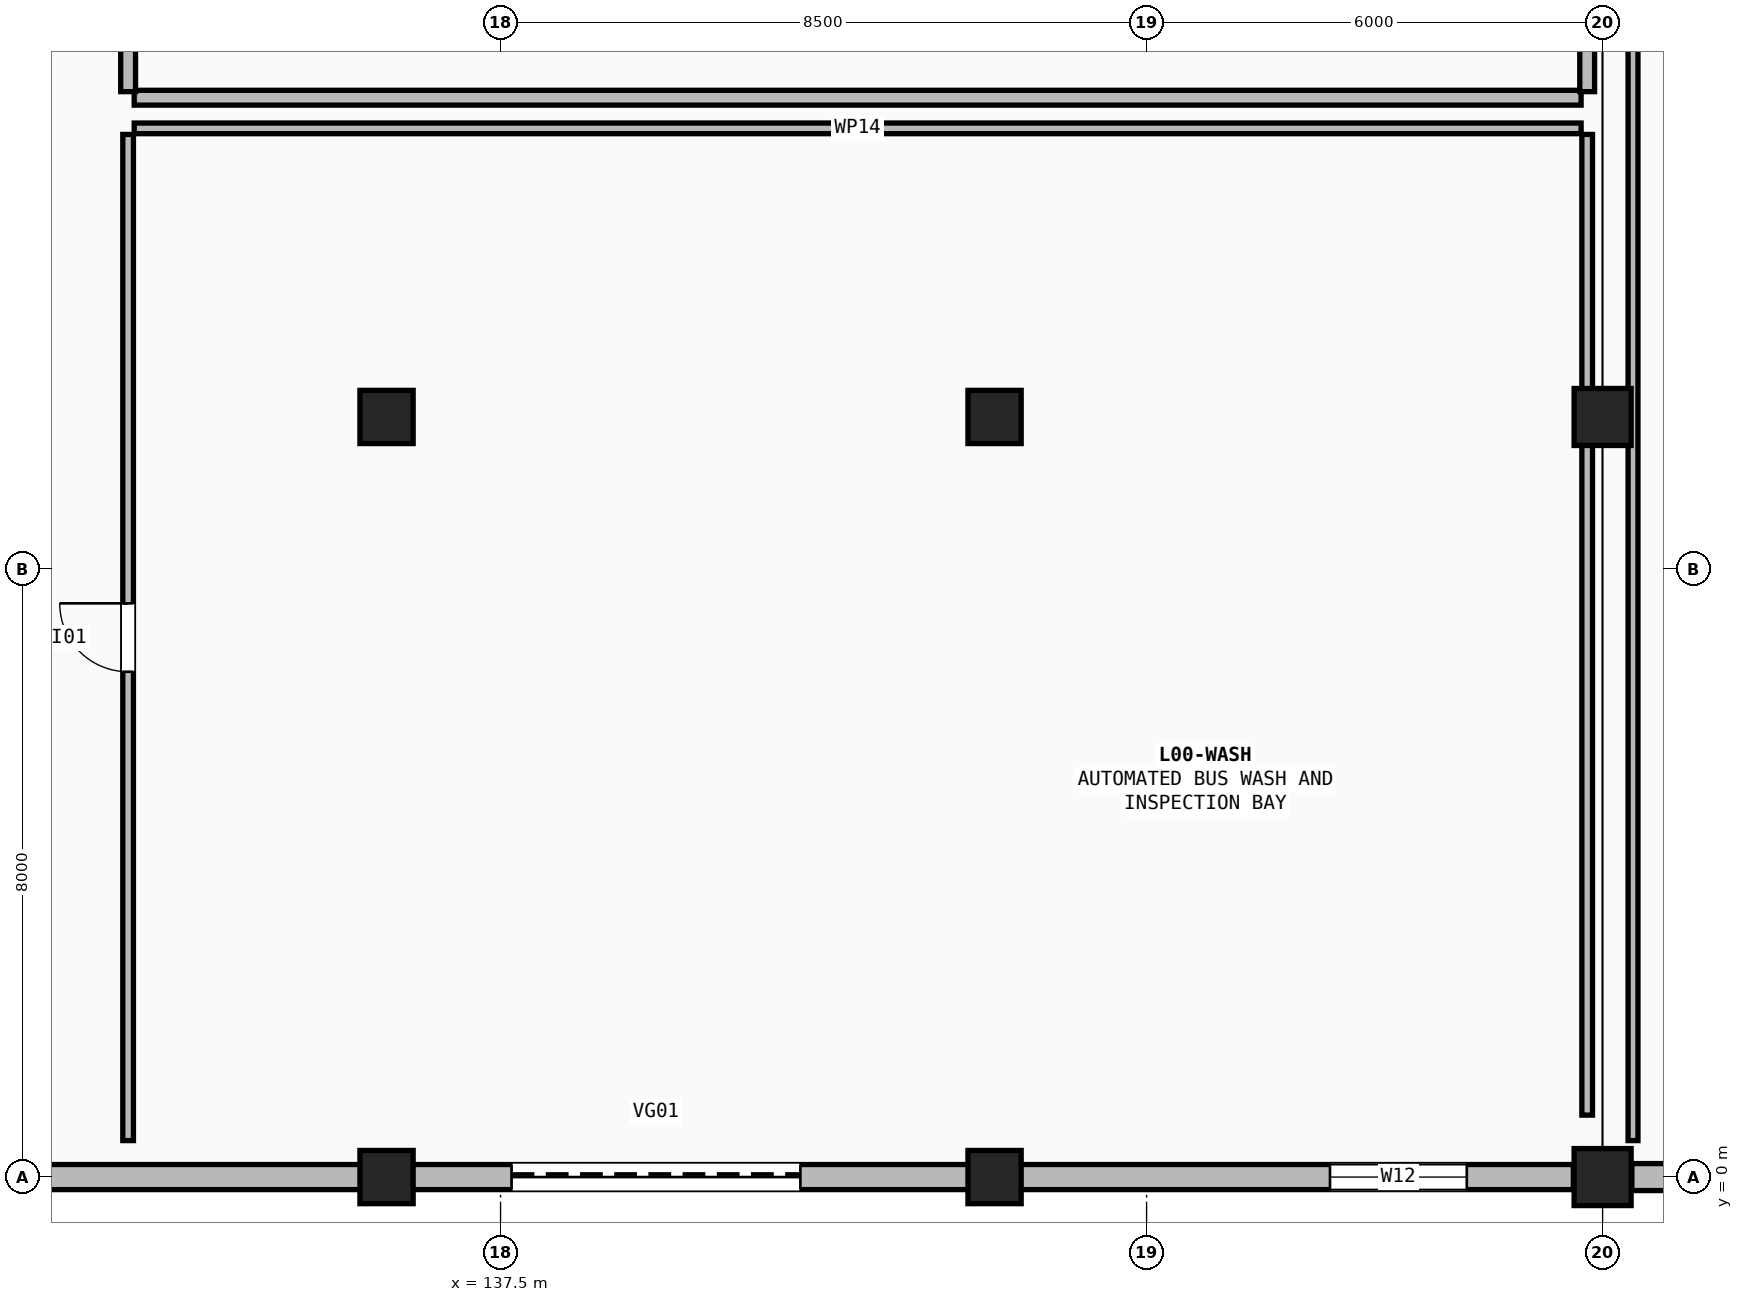
"""IFC4 building model, lengths in metres.
Left out: names, types, materials, properties, quantities, classifications, styles, units other than length and angle.
Written with IfcOpenShell. Run it as: python <this file> out.ifc"""

import sys

from ifc_helpers import new_model, si_unit, direction, frame, frame_2d, origin, origin_2d, place, context, subcontext, project, spatial, rectangle, extrude, element, fill, save


model = new_model("IFC4")
c1 = context("Model", 3, precision=1e-05, world=origin(), true_north=direction((0.0, 1.0)))
c2 = subcontext(c1, "Body", "Model", "MODEL_VIEW")
j1 = project(units=[si_unit("LENGTHUNIT", "METRE"), si_unit("PLANEANGLEUNIT", "RADIAN")], contexts=[c1])
p1 = place(None, origin())
s1 = spatial("IfcSite", under=j1, at=p1, CompositionType="ELEMENT")
p2 = place(p1, origin())
s2 = spatial("IfcBuilding", under=s1, at=p2, CompositionType="ELEMENT")
p3 = place(p2, origin())
s3 = spatial("IfcBuildingStorey", under=s2, at=p3, CompositionType="ELEMENT", Elevation=0.0)
for number, where, z_axis, x_axis in (
    (1, (136.0, 0.0, 0.0), (0.0, 0.0, 1.0), (1.0, 0.0, 0.0)),
    (2, (136.0, 10.0, 0.0), (0.0, 0.0, 1.0), (1.0, 0.0, 0.0)),
    (3, (144.0, 0.0, 0.0), (0.0, 0.0, 1.0), (1.0, 0.0, 0.0)),
    (4, (144.0, 10.0, 0.0), (0.0, 0.0, 1.0), (1.0, 0.0, 0.0)),
):
    element("IfcColumn", number, at=place(p3, frame(where, z_axis=z_axis, x_axis=x_axis)), inside=s3, PredefinedType="COLUMN", context=c2, shape_type="SweptSolid", body=[
        extrude(rectangle(XDim=0.7, YDim=0.7, at=origin_2d()), origin(), (0.0, 0.0, 1.0), 4.5),
    ])
for number, where, z_axis, x_axis in (
    (5, (152.0, 0.0, 0.0), (0.0, 0.0, 1.0), (1.0, 0.0, 0.0)),
    (6, (152.0, 10.0, 0.0), (0.0, 0.0, 1.0), (1.0, 0.0, 0.0)),
):
    element("IfcColumn", number, at=place(p3, frame(where, z_axis=z_axis, x_axis=x_axis)), inside=s3, PredefinedType="COLUMN", context=c2, shape_type="SweptSolid", body=[
        extrude(rectangle(XDim=0.75, YDim=0.75, at=origin_2d()), origin(), (0.0, 0.0, 1.0), 4.5),
    ])
p4 = place(p3, frame((128.59, 0.0, 0.0), z_axis=(0.0, 0.0, 1.0), x_axis=(1.0, 0.0, 0.0)))
e7 = element("IfcWall", 7, at=p4, inside=s3, PredefinedType="SOLIDWALL", context=c2, shape_type="SweptSolid", body=[
    extrude(rectangle(XDim=23.025, YDim=0.33, at=frame_2d((11.512, 0.0))), origin(), (0.0, 0.0, 1.0), 3.345),
])
p5 = place(p4, frame((1.217, 0.0, 0.0)))
e8 = element("IfcOpeningElement", 8, at=p5, cuts=e7, PredefinedType="OPENING", context=c2, shape_type="SweptSolid", body=[
    extrude(rectangle(XDim=1.25, YDim=2.2, at=frame_2d((0.625, 1.1))), frame((0.0, 0.175, 0.0), z_axis=(0.0, -1.0, 0.0), x_axis=(1.0, 0.0, 0.0)), (0.0, 0.0, 1.0), 0.35),
])
p6 = place(p4, frame((9.055, 0.0, 0.0)))
e9 = element("IfcOpeningElement", 9, at=p6, cuts=e7, PredefinedType="OPENING", context=c2, shape_type="SweptSolid", body=[
    extrude(rectangle(XDim=3.8, YDim=3.2, at=frame_2d((1.9, 1.6))), frame((0.0, 0.175, 0.0), z_axis=(0.0, -1.0, 0.0), x_axis=(1.0, 0.0, 0.0)), (0.0, 0.0, 1.0), 0.35),
])
p7 = place(p4, frame((19.823, 0.0, 1.05)))
e10 = element("IfcOpeningElement", 10, at=p7, cuts=e7, PredefinedType="OPENING", context=c2, shape_type="SweptSolid", body=[
    extrude(rectangle(XDim=1.8, YDim=1.8, at=frame_2d((0.9, 0.9))), frame((0.0, 0.175, 0.0), z_axis=(0.0, -1.0, 0.0), x_axis=(1.0, 0.0, 0.0)), (0.0, 0.0, 1.0), 0.35),
])
p8 = place(p3, frame((152.385, 0.0, 0.0), z_axis=(0.0, 0.0, 1.0), x_axis=(1.0, 0.0, 0.0)))
e11 = element("IfcWall", 11, at=p8, inside=s3, PredefinedType="SOLIDWALL", context=c2, shape_type="SweptSolid", body=[
    extrude(rectangle(XDim=15.23, YDim=0.355, at=frame_2d((7.615, 0.0))), origin(), (0.0, 0.0, 1.0), 7.165),
])
p9 = place(p8, frame((5.015, 0.0, 0.0)))
e12 = element("IfcOpeningElement", 12, at=p9, cuts=e11, PredefinedType="OPENING", context=c2, shape_type="SweptSolid", body=[
    extrude(rectangle(XDim=5.2, YDim=4.2, at=frame_2d((2.6, 2.1))), frame((0.0, 0.188, 0.0), z_axis=(0.0, -1.0, 0.0), x_axis=(1.0, 0.0, 0.0)), (0.0, 0.0, 1.0), 0.375),
])
p10 = place(p8, frame((1.4, 0.0, 5.1)))
e13 = element("IfcOpeningElement", 13, at=p10, cuts=e11, PredefinedType="OPENING", context=c2, shape_type="SweptSolid", body=[
    extrude(rectangle(XDim=2.7, YDim=1.8, at=frame_2d((1.35, 0.9))), frame((0.0, 0.188, 0.0), z_axis=(0.0, -1.0, 0.0), x_axis=(1.0, 0.0, 0.0)), (0.0, 0.0, 1.0), 0.375),
])
p11 = place(p8, frame((11.0, 0.0, 5.1)))
e14 = element("IfcOpeningElement", 14, at=p11, cuts=e11, PredefinedType="OPENING", context=c2, shape_type="SweptSolid", body=[
    extrude(rectangle(XDim=2.7, YDim=1.8, at=frame_2d((1.35, 0.9))), frame((0.0, 0.188, 0.0), z_axis=(0.0, -1.0, 0.0), x_axis=(1.0, 0.0, 0.0)), (0.0, 0.0, 1.0), 0.375),
])
p12 = place(p3, frame((152.4, 0.48, 0.0), z_axis=(0.0, 0.0, 1.0), x_axis=(0.0, 1.0, 0.0)))
e15 = element("IfcWall", 15, at=p12, inside=s3, PredefinedType="PARTITIONING", context=c2, shape_type="SweptSolid", body=[
    extrude(rectangle(XDim=27.035, YDim=0.13, at=frame_2d((13.518, 0.0))), origin(), (0.0, 0.0, 1.0), 3.145),
])
p13 = place(p3, frame((132.68, 13.797, 0.0), z_axis=(0.0, 0.0, 1.0), x_axis=(1.0, 0.0, 0.0)))
e16 = element("IfcWall", 16, at=p13, inside=s3, PredefinedType="PARTITIONING", context=c2, shape_type="SweptSolid", body=[
    extrude(rectangle(XDim=19.037, YDim=0.14, at=frame_2d((9.519, 0.0))), origin(), (0.0, 0.0, 1.0), 3.695),
])
p14 = place(p3, frame((132.6, 0.48, 0.0), z_axis=(0.0, 0.0, 1.0), x_axis=(0.0, 1.0, 0.0)))
e17 = element("IfcWall", 17, at=p14, inside=s3, PredefinedType="PARTITIONING", context=c2, shape_type="SweptSolid", body=[
    extrude(rectangle(XDim=13.237, YDim=0.14, at=frame_2d((6.619, 0.0))), origin(), (0.0, 0.0, 1.0), 3.245),
])
p15 = place(p14, frame((6.168, 0.0, 0.0)))
e18 = element("IfcOpeningElement", 18, at=p15, cuts=e17, PredefinedType="OPENING", context=c2, shape_type="SweptSolid", body=[
    extrude(rectangle(XDim=0.9, YDim=2.1, at=frame_2d((0.45, 1.05))), frame((0.0, 0.08, 0.0), z_axis=(0.0, -1.0, 0.0), x_axis=(1.0, 0.0, 0.0)), (0.0, 0.0, 1.0), 0.16),
])
p16 = place(p3, frame((151.797, 0.815, 0.0), z_axis=(0.0, 0.0, 1.0), x_axis=(0.0, 1.0, 0.0)))
e19 = element("IfcWall", 19, at=p16, inside=s3, PredefinedType="PARTITIONING", context=c2, shape_type="SweptSolid", body=[
    extrude(rectangle(XDim=12.902, YDim=0.14, at=frame_2d((6.451, 0.0))), origin(), (0.0, 0.0, 1.0), 3.495),
])
p17 = place(p3, frame((132.68, 14.2, 0.0), z_axis=(0.0, 0.0, 1.0), x_axis=(1.0, 0.0, 0.0)))
e20 = element("IfcWall", 20, at=p17, inside=s3, PredefinedType="PARTITIONING", context=c2, shape_type="SweptSolid", body=[
    extrude(rectangle(XDim=19.037, YDim=0.195, at=frame_2d((9.519, 0.0))), origin(), (0.0, 0.0, 1.0), 3.695),
])
p18 = place(p3, frame((132.6, 14.28, 0.0), z_axis=(0.0, 0.0, 1.0), x_axis=(0.0, 1.0, 0.0)))
e21 = element("IfcWall", 21, at=p18, inside=s3, PredefinedType="PARTITIONING", context=c2, shape_type="SweptSolid", body=[
    extrude(rectangle(XDim=13.237, YDim=0.195, at=frame_2d((6.619, 0.0))), origin(), (0.0, 0.0, 1.0), 3.245),
])
p19 = place(p3, frame((151.797, 14.28, 0.0), z_axis=(0.0, 0.0, 1.0), x_axis=(0.0, 1.0, 0.0)))
e22 = element("IfcWall", 22, at=p19, inside=s3, PredefinedType="PARTITIONING", context=c2, shape_type="SweptSolid", body=[
    extrude(rectangle(XDim=12.902, YDim=0.195, at=frame_2d((6.451, 0.0))), origin(), (0.0, 0.0, 1.0), 3.145),
])
p20 = place(p6, origin())
e23 = element("IfcDoor", 23, at=p20, inside=s3, OperationType="ROLLINGUP", PredefinedType="GATE", context=c2, shape_type="SweptSolid", body=[
    extrude(rectangle(XDim=3.8, YDim=3.2, at=frame_2d((1.9, 1.6))), frame((0.0, 0.025, 0.0), z_axis=(0.0, -1.0, 0.0), x_axis=(1.0, 0.0, 0.0)), (0.0, 0.0, 1.0), 0.05),
])
fill(e9, e23)
p21 = place(p7, origin())
e24 = element("IfcWindow", 24, at=p21, inside=s3, PartitioningType="SINGLE_PANEL", PredefinedType="WINDOW", context=c2, shape_type="SweptSolid", body=[
    extrude(rectangle(XDim=1.8, YDim=1.8, at=frame_2d((0.9, 0.9))), frame((0.0, 0.03, 0.0), z_axis=(0.0, -1.0, 0.0), x_axis=(1.0, 0.0, 0.0)), (0.0, 0.0, 1.0), 0.06),
])
fill(e10, e24)
p22 = place(p15, origin())
e25 = element("IfcDoor", 25, at=p22, inside=s3, OperationType="SINGLE_SWING_RIGHT", PredefinedType="DOOR", context=c2, shape_type="SweptSolid", body=[
    extrude(rectangle(XDim=0.9, YDim=2.1, at=frame_2d((0.45, 1.05))), frame((0.0, 0.025, 0.0), z_axis=(0.0, -1.0, 0.0), x_axis=(1.0, 0.0, 0.0)), (0.0, 0.0, 1.0), 0.05),
])
fill(e18, e25)
save(model, sys.argv[1])
